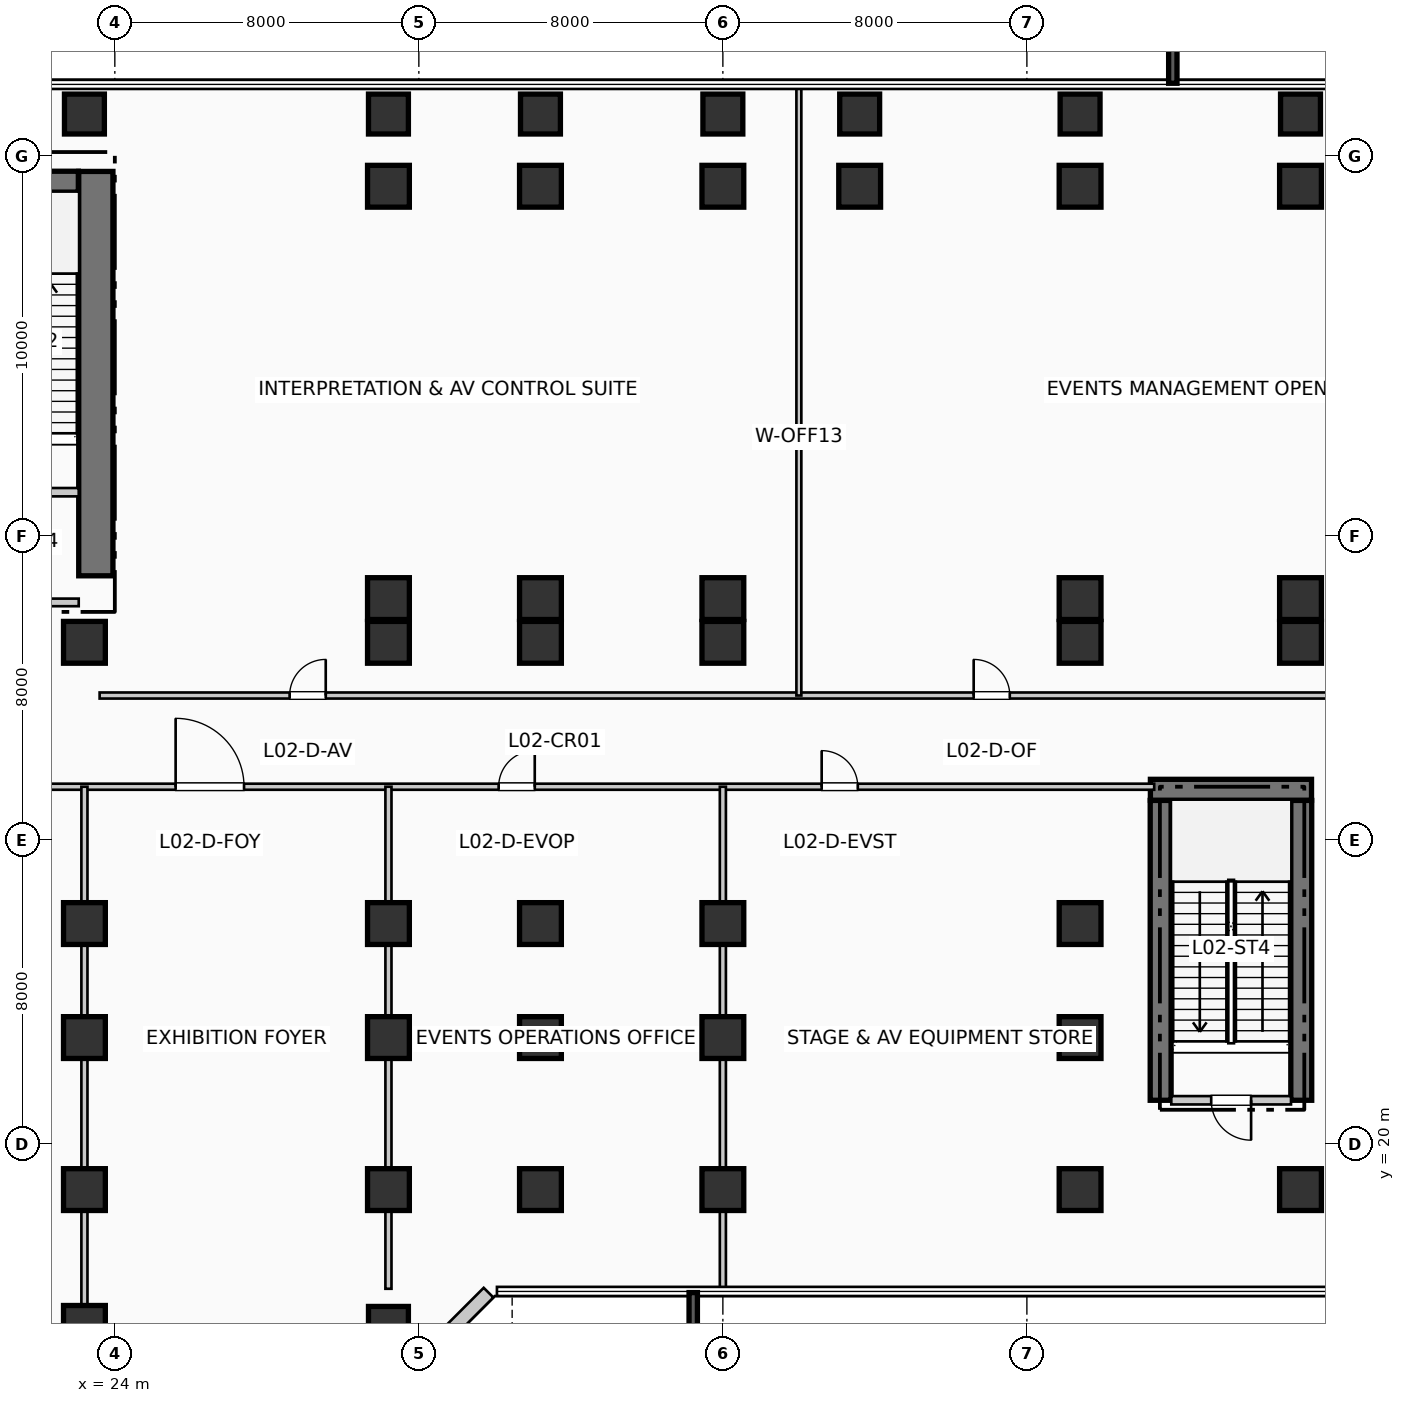
"""IFC4 building model, lengths in metres.
Left out: names, types, materials, properties, quantities, classifications, styles, units other than length and angle.
Written with IfcOpenShell. Run it as: python <this file> out.ifc"""

import sys

from ifc_helpers import new_model, si_unit, direction, frame, frame_2d, origin, origin_2d, place, context, subcontext, project, spatial, rectangle, extrude, element, fill, save


model = new_model("IFC4")
c1 = context("Model", 3, precision=1e-05, world=origin(), true_north=direction((0.0, 1.0)))
c2 = subcontext(c1, "Body", "Model", "MODEL_VIEW")
j1 = project(units=[si_unit("LENGTHUNIT", "METRE"), si_unit("PLANEANGLEUNIT", "RADIAN")], contexts=[c1])
p1 = place(None, origin())
s1 = spatial("IfcSite", under=j1, at=p1, CompositionType="ELEMENT")
p2 = place(p1, origin())
s2 = spatial("IfcBuilding", under=s1, at=p2, CompositionType="ELEMENT")
p3 = place(p2, frame((0.0, 0.0, 11.22)))
s3 = spatial("IfcBuildingStorey", under=s2, at=p3, CompositionType="ELEMENT", Elevation=11.22)
p4 = place(p3, frame((23.5, 34.95, 0.0), z_axis=(0.0, 0.0, 1.0), x_axis=(0.0, 1.0, 0.0)))
e1 = element("IfcWall", 1, at=p4, inside=s3, PredefinedType="SHEAR", context=c2, shape_type="SweptSolid", body=[
    extrude(rectangle(XDim=10.64, YDim=0.9, at=frame_2d((5.32, 0.0))), origin(), (0.0, 0.0, 1.0), 5.28),
])
p5 = place(p3, frame((19.35, 45.32, 0.0), z_axis=(0.0, 0.0, 1.0), x_axis=(1.0, 0.0, 0.0)))
e2 = element("IfcWall", 2, at=p5, inside=s3, PredefinedType="SHEAR", context=c2, shape_type="SweptSolid", body=[
    extrude(rectangle(XDim=3.69, YDim=0.55, at=frame_2d((1.845, 0.0))), origin(), (0.0, 0.0, 1.0), 5.28),
])
for number, where, z_axis, x_axis in (
    (3, (51.52, 21.15, 0.0), (0.0, 0.0, 1.0), (0.0, 1.0, 0.0)),
    (4, (55.22, 21.15, 0.0), (0.0, 0.0, 1.0), (0.0, 1.0, 0.0)),
):
    element("IfcWall", number, at=place(p3, frame(where, z_axis=z_axis, x_axis=x_axis)), inside=s3, PredefinedType="SHEAR", context=c2, shape_type="SweptSolid", body=[
        extrude(rectangle(XDim=7.89, YDim=0.55, at=frame_2d((3.945, 0.0))), origin(), (0.0, 0.0, 1.0), 5.28),
    ])
p6 = place(p3, frame((51.25, 29.32, 0.0), z_axis=(0.0, 0.0, 1.0), x_axis=(1.0, 0.0, 0.0)))
e5 = element("IfcWall", 5, at=p6, inside=s3, PredefinedType="SHEAR", context=c2, shape_type="SweptSolid", body=[
    extrude(rectangle(XDim=4.24, YDim=0.55, at=frame_2d((2.12, 0.0))), origin(), (0.0, 0.0, 1.0), 5.28),
])
for number, where, z_axis, x_axis in (
    (6, (23.2, 15.2, 0.0), (0.0, 0.0, 1.0), (1.0, 0.0, 0.0)),
    (7, (23.2, 18.8, 0.0), (0.0, 0.0, 1.0), (1.0, 0.0, 0.0)),
    (8, (23.2, 22.8, 0.0), (0.0, 0.0, 1.0), (1.0, 0.0, 0.0)),
    (9, (23.2, 25.8, 0.0), (0.0, 0.0, 1.0), (1.0, 0.0, 0.0)),
    (10, (23.2, 33.2, 0.0), (0.0, 0.0, 1.0), (1.0, 0.0, 0.0)),
):
    element("IfcColumn", number, at=place(p3, frame(where, z_axis=z_axis, x_axis=x_axis)), inside=s3, PredefinedType="COLUMN", context=c2, shape_type="SweptSolid", body=[
        extrude(rectangle(XDim=1.1, YDim=1.1, at=origin_2d()), origin(), (0.0, 0.0, 1.0), 5.28),
    ])
for number, where, z_axis, x_axis in (
    (11, (23.2, 47.1, 0.0), (0.0, 0.0, 1.0), (1.0, 0.0, 0.0)),
    (12, (31.2, 15.2, 0.0), (0.0, 0.0, 1.0), (1.0, 0.0, 0.0)),
):
    element("IfcColumn", number, at=place(p3, frame(where, z_axis=z_axis, x_axis=x_axis)), inside=s3, PredefinedType="COLUMN", context=c2, shape_type="SweptSolid", body=[
        extrude(rectangle(XDim=1.05, YDim=1.05, at=origin_2d()), origin(), (0.0, 0.0, 1.0), 5.28),
    ])
for number, where, z_axis, x_axis in (
    (13, (31.2, 18.8, 0.0), (0.0, 0.0, 1.0), (1.0, 0.0, 0.0)),
    (14, (31.2, 22.8, 0.0), (0.0, 0.0, 1.0), (1.0, 0.0, 0.0)),
    (15, (31.2, 25.8, 0.0), (0.0, 0.0, 1.0), (1.0, 0.0, 0.0)),
    (16, (31.2, 33.2, 0.0), (0.0, 0.0, 1.0), (1.0, 0.0, 0.0)),
    (17, (31.2, 34.35, 0.0), (0.0, 0.0, 1.0), (1.0, 0.0, 0.0)),
    (18, (31.2, 45.2, 0.0), (0.0, 0.0, 1.0), (1.0, 0.0, 0.0)),
):
    element("IfcColumn", number, at=place(p3, frame(where, z_axis=z_axis, x_axis=x_axis)), inside=s3, PredefinedType="COLUMN", context=c2, shape_type="SweptSolid", body=[
        extrude(rectangle(XDim=1.1, YDim=1.1, at=origin_2d()), origin(), (0.0, 0.0, 1.0), 5.28),
    ])
p7 = place(p3, frame((31.2, 47.1, 0.0), z_axis=(0.0, 0.0, 1.0), x_axis=(1.0, 0.0, 0.0)))
e19 = element("IfcColumn", 19, at=p7, inside=s3, PredefinedType="COLUMN", context=c2, shape_type="SweptSolid", body=[
    extrude(rectangle(XDim=1.05, YDim=1.05, at=origin_2d()), origin(), (0.0, 0.0, 1.0), 5.28),
])
for number, where, z_axis, x_axis in (
    (20, (35.2, 18.8, 0.0), (0.0, 0.0, 1.0), (1.0, 0.0, 0.0)),
    (21, (35.2, 22.8, 0.0), (0.0, 0.0, 1.0), (1.0, 0.0, 0.0)),
    (22, (35.2, 25.8, 0.0), (0.0, 0.0, 1.0), (1.0, 0.0, 0.0)),
    (23, (35.2, 33.2, 0.0), (0.0, 0.0, 1.0), (1.0, 0.0, 0.0)),
    (24, (35.2, 34.35, 0.0), (0.0, 0.0, 1.0), (1.0, 0.0, 0.0)),
    (25, (35.2, 45.2, 0.0), (0.0, 0.0, 1.0), (1.0, 0.0, 0.0)),
):
    element("IfcColumn", number, at=place(p3, frame(where, z_axis=z_axis, x_axis=x_axis)), inside=s3, PredefinedType="COLUMN", context=c2, shape_type="SweptSolid", body=[
        extrude(rectangle(XDim=1.1, YDim=1.1, at=origin_2d()), origin(), (0.0, 0.0, 1.0), 5.28),
    ])
p8 = place(p3, frame((35.2, 47.1, 0.0), z_axis=(0.0, 0.0, 1.0), x_axis=(1.0, 0.0, 0.0)))
e26 = element("IfcColumn", 26, at=p8, inside=s3, PredefinedType="COLUMN", context=c2, shape_type="SweptSolid", body=[
    extrude(rectangle(XDim=1.05, YDim=1.05, at=origin_2d()), origin(), (0.0, 0.0, 1.0), 5.28),
])
for number, where, z_axis, x_axis in (
    (27, (40.0, 18.8, 0.0), (0.0, 0.0, 1.0), (1.0, 0.0, 0.0)),
    (28, (40.0, 22.8, 0.0), (0.0, 0.0, 1.0), (1.0, 0.0, 0.0)),
    (29, (40.0, 25.8, 0.0), (0.0, 0.0, 1.0), (1.0, 0.0, 0.0)),
    (30, (40.0, 33.2, 0.0), (0.0, 0.0, 1.0), (1.0, 0.0, 0.0)),
    (31, (40.0, 34.35, 0.0), (0.0, 0.0, 1.0), (1.0, 0.0, 0.0)),
    (32, (40.0, 45.2, 0.0), (0.0, 0.0, 1.0), (1.0, 0.0, 0.0)),
):
    element("IfcColumn", number, at=place(p3, frame(where, z_axis=z_axis, x_axis=x_axis)), inside=s3, PredefinedType="COLUMN", context=c2, shape_type="SweptSolid", body=[
        extrude(rectangle(XDim=1.1, YDim=1.1, at=origin_2d()), origin(), (0.0, 0.0, 1.0), 5.28),
    ])
p9 = place(p3, frame((40.0, 47.1, 0.0), z_axis=(0.0, 0.0, 1.0), x_axis=(1.0, 0.0, 0.0)))
e33 = element("IfcColumn", 33, at=p9, inside=s3, PredefinedType="COLUMN", context=c2, shape_type="SweptSolid", body=[
    extrude(rectangle(XDim=1.05, YDim=1.05, at=origin_2d()), origin(), (0.0, 0.0, 1.0), 5.28),
])
p10 = place(p3, frame((43.6, 45.2, 0.0), z_axis=(0.0, 0.0, 1.0), x_axis=(1.0, 0.0, 0.0)))
e34 = element("IfcColumn", 34, at=p10, inside=s3, PredefinedType="COLUMN", context=c2, shape_type="SweptSolid", body=[
    extrude(rectangle(XDim=1.1, YDim=1.1, at=origin_2d()), origin(), (0.0, 0.0, 1.0), 5.28),
])
p11 = place(p3, frame((43.6, 47.1, 0.0), z_axis=(0.0, 0.0, 1.0), x_axis=(1.0, 0.0, 0.0)))
e35 = element("IfcColumn", 35, at=p11, inside=s3, PredefinedType="COLUMN", context=c2, shape_type="SweptSolid", body=[
    extrude(rectangle(XDim=1.05, YDim=1.05, at=origin_2d()), origin(), (0.0, 0.0, 1.0), 5.28),
])
for number, where, z_axis, x_axis in (
    (36, (49.4, 18.8, 0.0), (0.0, 0.0, 1.0), (1.0, 0.0, 0.0)),
    (37, (49.4, 22.8, 0.0), (0.0, 0.0, 1.0), (1.0, 0.0, 0.0)),
    (38, (49.4, 25.8, 0.0), (0.0, 0.0, 1.0), (1.0, 0.0, 0.0)),
    (39, (49.4, 33.2, 0.0), (0.0, 0.0, 1.0), (1.0, 0.0, 0.0)),
    (40, (49.4, 34.35, 0.0), (0.0, 0.0, 1.0), (1.0, 0.0, 0.0)),
    (41, (49.4, 45.2, 0.0), (0.0, 0.0, 1.0), (1.0, 0.0, 0.0)),
):
    element("IfcColumn", number, at=place(p3, frame(where, z_axis=z_axis, x_axis=x_axis)), inside=s3, PredefinedType="COLUMN", context=c2, shape_type="SweptSolid", body=[
        extrude(rectangle(XDim=1.1, YDim=1.1, at=origin_2d()), origin(), (0.0, 0.0, 1.0), 5.28),
    ])
p12 = place(p3, frame((49.4, 47.1, 0.0), z_axis=(0.0, 0.0, 1.0), x_axis=(1.0, 0.0, 0.0)))
e42 = element("IfcColumn", 42, at=p12, inside=s3, PredefinedType="COLUMN", context=c2, shape_type="SweptSolid", body=[
    extrude(rectangle(XDim=1.05, YDim=1.05, at=origin_2d()), origin(), (0.0, 0.0, 1.0), 5.28),
])
for number, where, z_axis, x_axis in (
    (43, (55.2, 18.8, 0.0), (0.0, 0.0, 1.0), (1.0, 0.0, 0.0)),
    (44, (55.2, 33.2, 0.0), (0.0, 0.0, 1.0), (1.0, 0.0, 0.0)),
    (45, (55.2, 34.35, 0.0), (0.0, 0.0, 1.0), (1.0, 0.0, 0.0)),
    (46, (55.2, 45.2, 0.0), (0.0, 0.0, 1.0), (1.0, 0.0, 0.0)),
):
    element("IfcColumn", number, at=place(p3, frame(where, z_axis=z_axis, x_axis=x_axis)), inside=s3, PredefinedType="COLUMN", context=c2, shape_type="SweptSolid", body=[
        extrude(rectangle(XDim=1.1, YDim=1.1, at=origin_2d()), origin(), (0.0, 0.0, 1.0), 5.28),
    ])
p13 = place(p3, frame((55.2, 47.1, 0.0), z_axis=(0.0, 0.0, 1.0), x_axis=(1.0, 0.0, 0.0)))
e47 = element("IfcColumn", 47, at=p13, inside=s3, PredefinedType="COLUMN", context=c2, shape_type="SweptSolid", body=[
    extrude(rectangle(XDim=1.05, YDim=1.05, at=origin_2d()), origin(), (0.0, 0.0, 1.0), 5.28),
])
p14 = place(p3, frame((31.912, 14.166, 0.0), z_axis=(0.0, 0.0, 1.0), x_axis=(0.707106781187, 0.707106781187, 0.0)))
e48 = element("IfcWall", 48, at=p14, inside=s3, PredefinedType="SOLIDWALL", context=c2, shape_type="SweptSolid", body=[
    extrude(rectangle(XDim=2.718, YDim=0.36, at=frame_2d((1.359, 0.0))), origin(), (0.0, 0.0, 1.0), 4.96),
])
p15 = place(p3, frame((19.9, 37.15, 0.0), z_axis=(0.0, 0.0, 1.0), x_axis=(1.0, 0.0, 0.0)))
e49 = element("IfcWall", 49, at=p15, inside=s3, PredefinedType="PARTITIONING", context=c2, shape_type="SweptSolid", body=[
    extrude(rectangle(XDim=3.15, YDim=0.22, at=frame_2d((1.575, 0.0))), origin(), (0.0, 0.0, 1.0), 4.96),
])
p16 = place(p15, frame((2.05, 0.0, 0.0), z_axis=(0.0, 0.0, 1.0), x_axis=(-1.0, 0.0, 0.0)))
e50 = element("IfcOpeningElement", 50, at=p16, cuts=e49, PredefinedType="OPENING", context=c2, shape_type="SweptSolid", body=[
    extrude(rectangle(XDim=1.05, YDim=2.15, at=frame_2d((0.525, 1.075))), frame((0.0, 0.12, 0.0), z_axis=(0.0, -1.0, 0.0), x_axis=(1.0, 0.0, 0.0)), (0.0, 0.0, 1.0), 0.24),
])
p17 = place(p3, frame((19.8, 34.25, 0.0), z_axis=(0.0, 0.0, 1.0), x_axis=(1.0, 0.0, 0.0)))
e51 = element("IfcWall", 51, at=p17, inside=s3, PredefinedType="PARTITIONING", context=c2, shape_type="SweptSolid", body=[
    extrude(rectangle(XDim=3.25, YDim=0.2, at=frame_2d((1.625, 0.0))), origin(), (0.0, 0.0, 1.0), 4.96),
])
p18 = place(p17, frame((2.15, 0.0, 0.0), z_axis=(0.0, 0.0, 1.0), x_axis=(-1.0, 0.0, 0.0)))
e52 = element("IfcOpeningElement", 52, at=p18, cuts=e51, PredefinedType="OPENING", context=c2, shape_type="SweptSolid", body=[
    extrude(rectangle(XDim=1.1, YDim=2.15, at=frame_2d((0.55, 1.075))), frame((0.0, 0.11, 0.0), z_axis=(0.0, -1.0, 0.0), x_axis=(1.0, 0.0, 0.0)), (0.0, 0.0, 1.0), 0.22),
])
p19 = place(p3, frame((51.8, 21.15, 0.0), z_axis=(0.0, 0.0, 1.0), x_axis=(1.0, 0.0, 0.0)))
e53 = element("IfcWall", 53, at=p19, inside=s3, PredefinedType="PARTITIONING", context=c2, shape_type="SweptSolid", body=[
    extrude(rectangle(XDim=3.15, YDim=0.22, at=frame_2d((1.575, 0.0))), origin(), (0.0, 0.0, 1.0), 4.96),
])
p20 = place(p19, frame((2.1, 0.0, 0.0), z_axis=(0.0, 0.0, 1.0), x_axis=(-1.0, 0.0, 0.0)))
e54 = element("IfcOpeningElement", 54, at=p20, cuts=e53, PredefinedType="OPENING", context=c2, shape_type="SweptSolid", body=[
    extrude(rectangle(XDim=1.05, YDim=2.15, at=frame_2d((0.525, 1.075))), frame((0.0, 0.12, 0.0), z_axis=(0.0, -1.0, 0.0), x_axis=(1.0, 0.0, 0.0)), (0.0, 0.0, 1.0), 0.24),
])
p21 = place(p3, frame((7.6, 29.4, 0.0), z_axis=(0.0, 0.0, 1.0), x_axis=(1.0, 0.0, 0.0)))
e55 = element("IfcWall", 55, at=p21, inside=s3, PredefinedType="PARTITIONING", context=c2, shape_type="SweptSolid", body=[
    extrude(rectangle(XDim=43.75, YDim=0.16, at=frame_2d((21.875, 0.0))), origin(), (0.0, 0.0, 1.0), 4.615),
])
p22 = place(p21, frame((2.5, 0.0, 0.0)))
e56 = element("IfcOpeningElement", 56, at=p22, cuts=e55, PredefinedType="OPENING", context=c2, shape_type="SweptSolid", body=[
    extrude(rectangle(XDim=1.8, YDim=2.3, at=frame_2d((0.9, 1.15))), frame((0.0, 0.09, 0.0), z_axis=(0.0, -1.0, 0.0), x_axis=(1.0, 0.0, 0.0)), (0.0, 0.0, 1.0), 0.18),
])
p23 = place(p21, frame((11.0, 0.0, 0.0)))
e57 = element("IfcOpeningElement", 57, at=p23, cuts=e55, PredefinedType="OPENING", context=c2, shape_type="SweptSolid", body=[
    extrude(rectangle(XDim=1.8, YDim=2.3, at=frame_2d((0.9, 1.15))), frame((0.0, 0.09, 0.0), z_axis=(0.0, -1.0, 0.0), x_axis=(1.0, 0.0, 0.0)), (0.0, 0.0, 1.0), 0.18),
])
p24 = place(p21, frame((18.0, 0.0, 0.0)))
e58 = element("IfcOpeningElement", 58, at=p24, cuts=e55, PredefinedType="OPENING", context=c2, shape_type="SweptSolid", body=[
    extrude(rectangle(XDim=1.8, YDim=2.3, at=frame_2d((0.9, 1.15))), frame((0.0, 0.09, 0.0), z_axis=(0.0, -1.0, 0.0), x_axis=(1.0, 0.0, 0.0)), (0.0, 0.0, 1.0), 0.18),
])
p25 = place(p21, frame((26.5, 0.0, 0.0)))
e59 = element("IfcOpeningElement", 59, at=p25, cuts=e55, PredefinedType="OPENING", context=c2, shape_type="SweptSolid", body=[
    extrude(rectangle(XDim=0.95, YDim=2.15, at=frame_2d((0.475, 1.075))), frame((0.0, 0.09, 0.0), z_axis=(0.0, -1.0, 0.0), x_axis=(1.0, 0.0, 0.0)), (0.0, 0.0, 1.0), 0.18),
])
p26 = place(p21, frame((35.0, 0.0, 0.0)))
e60 = element("IfcOpeningElement", 60, at=p26, cuts=e55, PredefinedType="OPENING", context=c2, shape_type="SweptSolid", body=[
    extrude(rectangle(XDim=0.95, YDim=2.15, at=frame_2d((0.475, 1.075))), frame((0.0, 0.09, 0.0), z_axis=(0.0, -1.0, 0.0), x_axis=(1.0, 0.0, 0.0)), (0.0, 0.0, 1.0), 0.18),
])
p27 = place(p3, frame((23.2, -1.81, 0.0), z_axis=(0.0, 0.0, 1.0), x_axis=(0.0, 1.0, 0.0)))
e61 = element("IfcWall", 61, at=p27, inside=s3, PredefinedType="PARTITIONING", context=c2, shape_type="SweptSolid", body=[
    extrude(rectangle(XDim=31.21, YDim=0.16, at=frame_2d((15.605, 0.0))), origin(), (0.0, 0.0, 1.0), 4.145),
])
for number, where, z_axis, x_axis in (
    (62, (31.2, 16.19, 0.0), (0.0, 0.0, 1.0), (0.0, 1.0, 0.0)),
    (63, (40.0, 16.19, 0.0), (0.0, 0.0, 1.0), (0.0, 1.0, 0.0)),
):
    element("IfcWall", number, at=place(p3, frame(where, z_axis=z_axis, x_axis=x_axis)), inside=s3, PredefinedType="PARTITIONING", context=c2, shape_type="SweptSolid", body=[
        extrude(rectangle(XDim=13.21, YDim=0.16, at=frame_2d((6.605, 0.0))), origin(), (0.0, 0.0, 1.0), 4.145),
    ])
p28 = place(p3, frame((23.6, 31.8, 0.0), z_axis=(0.0, 0.0, 1.0), x_axis=(1.0, 0.0, 0.0)))
e64 = element("IfcWall", 64, at=p28, inside=s3, PredefinedType="PARTITIONING", context=c2, shape_type="SweptSolid", body=[
    extrude(rectangle(XDim=42.21, YDim=0.16, at=frame_2d((21.105, 0.0))), origin(), (0.0, 0.0, 1.0), 4.96),
])
p29 = place(p28, frame((5.0, 0.0, 0.0)))
e65 = element("IfcOpeningElement", 65, at=p29, cuts=e64, PredefinedType="OPENING", context=c2, shape_type="SweptSolid", body=[
    extrude(rectangle(XDim=0.95, YDim=2.15, at=frame_2d((0.475, 1.075))), frame((0.0, 0.09, 0.0), z_axis=(0.0, -1.0, 0.0), x_axis=(1.0, 0.0, 0.0)), (0.0, 0.0, 1.0), 0.18),
])
p30 = place(p28, frame((23.0, 0.0, 0.0)))
e66 = element("IfcOpeningElement", 66, at=p30, cuts=e64, PredefinedType="OPENING", context=c2, shape_type="SweptSolid", body=[
    extrude(rectangle(XDim=0.95, YDim=2.15, at=frame_2d((0.475, 1.075))), frame((0.0, 0.09, 0.0), z_axis=(0.0, -1.0, 0.0), x_axis=(1.0, 0.0, 0.0)), (0.0, 0.0, 1.0), 0.18),
])
p31 = place(p3, frame((42.0, 31.8, 0.0), z_axis=(0.0, 0.0, 1.0), x_axis=(0.0, 1.0, 0.0)))
e67 = element("IfcWall", 67, at=p31, inside=s3, PredefinedType="PARTITIONING", context=c2, shape_type="SweptSolid", body=[
    extrude(rectangle(XDim=16.01, YDim=0.13, at=frame_2d((8.005, 0.0))), origin(), (0.0, 0.0, 1.0), 4.96),
])
p32 = place(p20, origin())
e68 = element("IfcDoor", 68, at=p32, inside=s3, OperationType="SINGLE_SWING_RIGHT", PredefinedType="DOOR", context=c2, shape_type="SweptSolid", body=[
    extrude(rectangle(XDim=1.05, YDim=2.15, at=frame_2d((0.525, 1.075))), frame((0.0, 0.025, 0.0), z_axis=(0.0, -1.0, 0.0), x_axis=(1.0, 0.0, 0.0)), (0.0, 0.0, 1.0), 0.05),
])
fill(e54, e68)
p33 = place(p24, origin())
e69 = element("IfcDoor", 69, at=p33, inside=s3, OperationType="SINGLE_SWING_LEFT", PredefinedType="DOOR", context=c2, shape_type="SweptSolid", body=[
    extrude(rectangle(XDim=1.8, YDim=2.3, at=frame_2d((0.9, 1.15))), frame((0.0, 0.025, 0.0), z_axis=(0.0, -1.0, 0.0), x_axis=(1.0, 0.0, 0.0)), (0.0, 0.0, 1.0), 0.05),
])
fill(e58, e69)
p34 = place(p25, origin())
e70 = element("IfcDoor", 70, at=p34, inside=s3, OperationType="SINGLE_SWING_RIGHT", PredefinedType="DOOR", context=c2, shape_type="SweptSolid", body=[
    extrude(rectangle(XDim=0.95, YDim=2.15, at=frame_2d((0.475, 1.075))), frame((0.0, 0.025, 0.0), z_axis=(0.0, -1.0, 0.0), x_axis=(1.0, 0.0, 0.0)), (0.0, 0.0, 1.0), 0.05),
])
fill(e59, e70)
p35 = place(p26, origin())
e71 = element("IfcDoor", 71, at=p35, inside=s3, OperationType="SINGLE_SWING_LEFT", PredefinedType="DOOR", context=c2, shape_type="SweptSolid", body=[
    extrude(rectangle(XDim=0.95, YDim=2.15, at=frame_2d((0.475, 1.075))), frame((0.0, 0.025, 0.0), z_axis=(0.0, -1.0, 0.0), x_axis=(1.0, 0.0, 0.0)), (0.0, 0.0, 1.0), 0.05),
])
fill(e60, e71)
p36 = place(p29, origin())
e72 = element("IfcDoor", 72, at=p36, inside=s3, OperationType="SINGLE_SWING_RIGHT", PredefinedType="DOOR", context=c2, shape_type="SweptSolid", body=[
    extrude(rectangle(XDim=0.95, YDim=2.15, at=frame_2d((0.475, 1.075))), frame((0.0, 0.025, 0.0), z_axis=(0.0, -1.0, 0.0), x_axis=(1.0, 0.0, 0.0)), (0.0, 0.0, 1.0), 0.05),
])
fill(e65, e72)
p37 = place(p30, origin())
e73 = element("IfcDoor", 73, at=p37, inside=s3, OperationType="SINGLE_SWING_LEFT", PredefinedType="DOOR", context=c2, shape_type="SweptSolid", body=[
    extrude(rectangle(XDim=0.95, YDim=2.15, at=frame_2d((0.475, 1.075))), frame((0.0, 0.025, 0.0), z_axis=(0.0, -1.0, 0.0), x_axis=(1.0, 0.0, 0.0)), (0.0, 0.0, 1.0), 0.05),
])
fill(e66, e73)
save(model, sys.argv[1])
